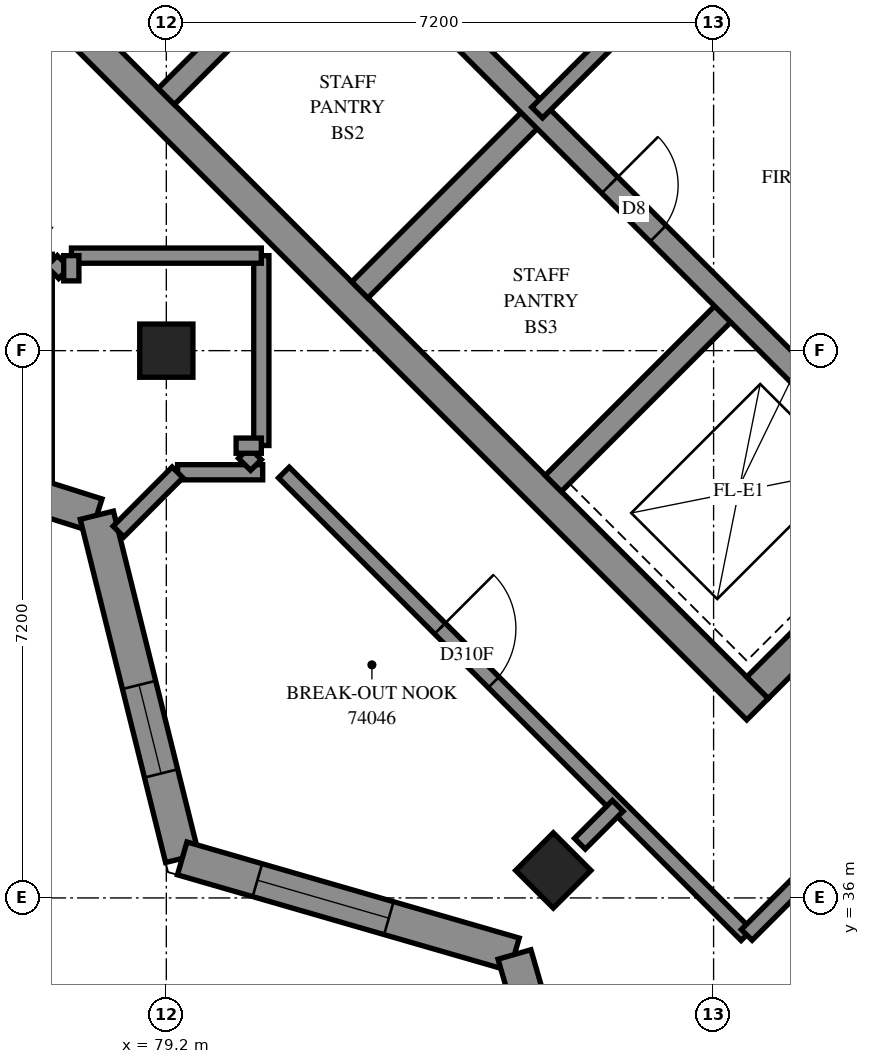
"""IFC4 building model, lengths in metres.
Left out: names, types, materials, properties, quantities, classifications, styles, units other than length and angle.
Written with IfcOpenShell. Run it as: python <this file> out.ifc"""

import sys

from ifc_helpers import new_model, si_unit, direction, frame, frame_2d, origin, origin_2d, place, context, subcontext, project, spatial, polyline, rectangle, outline, extrude, element, fill, save


model = new_model("IFC4")
c1 = context("Model", 3, precision=1e-05, world=origin(), true_north=direction((0.0, 1.0)))
c2 = subcontext(c1, "Body", "Model", "MODEL_VIEW")
j1 = project(units=[si_unit("LENGTHUNIT", "METRE"), si_unit("PLANEANGLEUNIT", "RADIAN")], contexts=[c1])
p1 = place(None, origin())
s1 = spatial("IfcSite", under=j1, at=p1, CompositionType="ELEMENT")
p2 = place(p1, origin())
s2 = spatial("IfcBuilding", under=s1, at=p2, CompositionType="ELEMENT")
p3 = place(p2, frame((0.0, 0.0, 271.0)))
s3 = spatial("IfcBuildingStorey", under=s2, at=p3, CompositionType="ELEMENT", Elevation=271.0)
for number, where, z_axis, x_axis in (
    (1, (79.2, 43.2, 0.0), (0.0, 0.0, 1.0), (1.0, 0.0, 0.0)),
    (2, (84.291, 36.362, 0.0), (0.0, 0.0, 1.0), (0.707, -0.707, 0.0)),
):
    element("IfcColumn", number, at=place(p3, frame(where, z_axis=z_axis, x_axis=x_axis)), inside=s3, PredefinedType="COLUMN", context=c2, shape_type="SweptSolid", body=[
        extrude(rectangle(XDim=0.7, YDim=0.7, at=origin_2d()), origin(), (0.0, 0.0, 1.0), 3.1),
    ])
p4 = place(p3, frame((76.23, 49.231, -0.3), z_axis=(0.0, 0.0, 1.0), x_axis=(0.7071034917, -0.7071100706, 0.0)))
e3 = element("IfcWall", 3, at=p4, inside=s3, PredefinedType="SHEAR", context=c2, shape_type="SweptSolid", body=[
    extrude(rectangle(XDim=15.2, YDim=0.4, at=frame_2d((7.6, 0.0))), origin(), (0.0, 0.0, 1.0), 2.7),
])
p5 = place(p3, frame((86.978, 38.766, -0.3), z_axis=(0.0, 0.0, 1.0), x_axis=(0.7071067812, 0.7071067812, 0.0)))
e4 = element("IfcWall", 4, at=p5, inside=s3, PredefinedType="SHEAR", context=c2, shape_type="SweptSolid", body=[
    extrude(rectangle(XDim=14.4, YDim=0.4, at=frame_2d((7.2, 0.0))), origin(), (0.0, 0.0, 1.0), 2.7),
])
p6 = place(p5, frame((4.55, 0.0, 0.3)))
e5 = element("IfcOpeningElement", 5, at=p6, cuts=e4, PredefinedType="OPENING", context=c2, shape_type="SweptSolid", body=[
    extrude(rectangle(XDim=1.1, YDim=2.1, at=frame_2d((0.55, 1.05))), frame((0.0, 0.21, 0.0), z_axis=(0.0, -1.0, 0.0), x_axis=(1.0, 0.0, 0.0)), (0.0, 0.0, 1.0), 0.42),
])
p7 = place(p5, frame((11.35, 0.0, 0.3)))
e6 = element("IfcOpeningElement", 6, at=p7, cuts=e4, PredefinedType="OPENING", context=c2, shape_type="SweptSolid", body=[
    extrude(rectangle(XDim=1.1, YDim=2.1, at=frame_2d((0.55, 1.05))), frame((0.0, 0.21, 0.0), z_axis=(0.0, -1.0, 0.0), x_axis=(1.0, 0.0, 0.0)), (0.0, 0.0, 1.0), 0.42),
])
p8 = place(p3, frame((79.2, 46.544, 0.0), z_axis=(0.0, 0.0, 1.0), x_axis=(0.7071219326, 0.7070916295, 0.0)))
e7 = element("IfcWall", 7, at=p8, inside=s3, PredefinedType="SOLIDWALL", context=c2, shape_type="SweptSolid", body=[
    extrude(rectangle(XDim=3.3, YDim=0.3, at=frame_2d((1.65, 0.0))), origin(), (0.0, 0.0, 1.0), 3.1),
])
for number, where, z_axis, x_axis in (
    (8, (81.746, 43.999, 0.0), (0.0, 0.0, 1.0), (0.707, 0.707, 0.0)),
    (9, (84.291, 41.453, 0.0), (0.0, 0.0, 1.0), (0.707, 0.707, 0.0)),
):
    element("IfcWall", number, at=place(p3, frame(where, z_axis=z_axis, x_axis=x_axis)), inside=s3, PredefinedType="SOLIDWALL", context=c2, shape_type="SweptSolid", body=[
        extrude(rectangle(XDim=3.3, YDim=0.3, at=frame_2d((1.65, 0.0))), origin(), (0.0, 0.0, 1.0), 3.1),
    ])
p9 = place(p3, frame((78.988, 51.423, 0.0), z_axis=(0.0, 0.0, 1.0), x_axis=(0.7071067812, -0.7071067812, 0.0)))
e10 = element("IfcWall", 10, at=p9, inside=s3, PredefinedType="SOLIDWALL", context=c2, shape_type="SweptSolid", body=[
    extrude(rectangle(XDim=14.4, YDim=0.3, at=frame_2d((7.2, 0.0))), origin(), (0.0, 0.0, 1.0), 3.1),
])
p10 = place(p9, frame((1.35, 0.0, 0.0)))
e11 = element("IfcOpeningElement", 11, at=p10, cuts=e10, PredefinedType="OPENING", context=c2, shape_type="SweptSolid", body=[
    extrude(rectangle(XDim=0.9, YDim=2.1, at=frame_2d((0.45, 1.05))), frame((0.0, 0.16, 0.0), z_axis=(0.0, -1.0, 0.0), x_axis=(1.0, 0.0, 0.0)), (0.0, 0.0, 1.0), 0.32),
])
p11 = place(p9, frame((4.95, 0.0, 0.0)))
e12 = element("IfcOpeningElement", 12, at=p11, cuts=e10, PredefinedType="OPENING", context=c2, shape_type="SweptSolid", body=[
    extrude(rectangle(XDim=0.9, YDim=2.1, at=frame_2d((0.45, 1.05))), frame((0.0, 0.16, 0.0), z_axis=(0.0, -1.0, 0.0), x_axis=(1.0, 0.0, 0.0)), (0.0, 0.0, 1.0), 0.32),
])
p12 = place(p9, frame((8.55, 0.0, 0.0)))
e13 = element("IfcOpeningElement", 13, at=p12, cuts=e10, PredefinedType="OPENING", context=c2, shape_type="SweptSolid", body=[
    extrude(rectangle(XDim=0.9, YDim=2.1, at=frame_2d((0.45, 1.05))), frame((0.0, 0.16, 0.0), z_axis=(0.0, -1.0, 0.0), x_axis=(1.0, 0.0, 0.0)), (0.0, 0.0, 1.0), 0.32),
])
p13 = place(p9, frame((12.05, 0.0, 0.0)))
e14 = element("IfcOpeningElement", 14, at=p13, cuts=e10, PredefinedType="OPENING", context=c2, shape_type="SweptSolid", body=[
    extrude(rectangle(XDim=1.1, YDim=2.1, at=frame_2d((0.55, 1.05))), frame((0.0, 0.16, 0.0), z_axis=(0.0, -1.0, 0.0), x_axis=(1.0, 0.0, 0.0)), (0.0, 0.0, 1.0), 0.32),
])
p14 = place(p3, frame((81.534, 53.969, 0.0), z_axis=(0.0, 0.0, 1.0), x_axis=(0.707103309, -0.7071102534, 0.0)))
e15 = element("IfcWall", 15, at=p14, inside=s3, PredefinedType="SOLIDWALL", context=c2, shape_type="SweptSolid", body=[
    extrude(rectangle(XDim=14.4, YDim=0.3, at=frame_2d((7.2, 0.0))), origin(), (0.0, 0.0, 1.0), 3.1),
])
p15 = place(p14, frame((8.55, 0.0, 0.0)))
e16 = element("IfcOpeningElement", 16, at=p15, cuts=e15, PredefinedType="OPENING", context=c2, shape_type="SweptSolid", body=[
    extrude(rectangle(XDim=0.9, YDim=2.1, at=frame_2d((0.45, 1.05))), frame((0.0, 0.16, 0.0), z_axis=(0.0, -1.0, 0.0), x_axis=(1.0, 0.0, 0.0)), (0.0, 0.0, 1.0), 0.32),
])
p16 = place(p14, frame((1.25, 0.0, 0.0)))
e17 = element("IfcOpeningElement", 17, at=p16, cuts=e15, PredefinedType="OPENING", context=c2, shape_type="SweptSolid", body=[
    extrude(rectangle(XDim=1.1, YDim=2.1, at=frame_2d((0.55, 1.05))), frame((0.0, 0.16, 0.0), z_axis=(0.0, -1.0, 0.0), x_axis=(1.0, 0.0, 0.0)), (0.0, 0.0, 1.0), 0.32),
])
p17 = place(p14, frame((4.85, 0.0, 0.0)))
e18 = element("IfcOpeningElement", 18, at=p17, cuts=e15, PredefinedType="OPENING", context=c2, shape_type="SweptSolid", body=[
    extrude(rectangle(XDim=1.1, YDim=2.1, at=frame_2d((0.55, 1.05))), frame((0.0, 0.16, 0.0), z_axis=(0.0, -1.0, 0.0), x_axis=(1.0, 0.0, 0.0)), (0.0, 0.0, 1.0), 0.32),
])
p18 = place(p14, frame((12.05, 0.0, 0.0)))
e19 = element("IfcOpeningElement", 19, at=p18, cuts=e15, PredefinedType="OPENING", context=c2, shape_type="SweptSolid", body=[
    extrude(rectangle(XDim=1.1, YDim=2.1, at=frame_2d((0.55, 1.05))), frame((0.0, 0.16, 0.0), z_axis=(0.0, -1.0, 0.0), x_axis=(1.0, 0.0, 0.0)), (0.0, 0.0, 1.0), 0.32),
])
p19 = place(p3, frame((74.504, 42.23, 0.0), z_axis=(0.0, 0.0, 1.0), x_axis=(0.9534896492, -0.3014257601, 0.0)))
e20 = element("IfcWall", 20, at=p19, inside=s3, PredefinedType="SOLIDWALL", context=c2, shape_type="SweptSolid", body=[
    extrude(outline(polyline([(0.052, -0.225), (3.841, -0.225), (4.093, 0.225), (-0.052, 0.225), (0.052, -0.225)])), origin(), (0.0, 0.0, 1.0), 3.1),
])
p20 = place(p19, frame((1.808, 0.0, 0.45)))
e21 = element("IfcOpeningElement", 21, at=p20, cuts=e20, PredefinedType="OPENING", context=c2, shape_type="SweptSolid", body=[
    extrude(rectangle(XDim=1.2, YDim=2.55, at=frame_2d((0.6, 1.275))), frame((0.0, 0.235, 0.0), z_axis=(0.0, -1.0, 0.0), x_axis=(1.0, 0.0, 0.0)), (0.0, 0.0, 1.0), 0.47),
])
p21 = place(p3, frame((78.286, 41.035, 0.0), z_axis=(0.0, 0.0, 1.0), x_axis=(0.2414328965, -0.9704175166, 0.0)))
e22 = element("IfcWall", 22, at=p21, inside=s3, PredefinedType="SOLIDWALL", context=c2, shape_type="SweptSolid", body=[
    extrude(outline(polyline([(0.126, -0.225), (4.782, -0.225), (4.522, 0.225), (-0.126, 0.225), (0.126, -0.225)])), origin(), (0.0, 0.0, 1.0), 3.1),
])
p22 = place(p21, frame((2.3, 0.0, 0.45)))
e23 = element("IfcOpeningElement", 23, at=p22, cuts=e22, PredefinedType="OPENING", context=c2, shape_type="SweptSolid", body=[
    extrude(rectangle(XDim=1.2, YDim=2.55, at=frame_2d((0.6, 1.275))), frame((0.0, 0.235, 0.0), z_axis=(0.0, -1.0, 0.0), x_axis=(1.0, 0.0, 0.0)), (0.0, 0.0, 1.0), 0.47),
])
p23 = place(p3, frame((79.409, 36.52, 0.0), z_axis=(0.0, 0.0, 1.0), x_axis=(0.9606525687, -0.2777528438, 0.0)))
e24 = element("IfcWall", 24, at=p23, inside=s3, PredefinedType="SOLIDWALL", context=c2, shape_type="SweptSolid", body=[
    extrude(outline(polyline([(-0.13, -0.225), (4.426, -0.225), (4.675, 0.225), (0.13, 0.225), (-0.13, -0.225)])), origin(), (0.0, 0.0, 1.0), 3.1),
])
p24 = place(p23, frame((1.03, 0.0, 0.7)))
e25 = element("IfcOpeningElement", 25, at=p24, cuts=e24, PredefinedType="OPENING", context=c2, shape_type="SweptSolid", body=[
    extrude(rectangle(XDim=1.8, YDim=1.8, at=frame_2d((0.9, 0.9))), frame((0.0, 0.235, 0.0), z_axis=(0.0, -1.0, 0.0), x_axis=(1.0, 0.0, 0.0)), (0.0, 0.0, 1.0), 0.47),
])
p25 = place(p3, frame((83.78, 35.256, 0.0), z_axis=(0.0, 0.0, 1.0), x_axis=(0.2777528438, -0.9606525687, 0.0)))
e26 = element("IfcWall", 26, at=p25, inside=s3, PredefinedType="SOLIDWALL", context=c2, shape_type="SweptSolid", body=[
    extrude(outline(polyline([(0.124, -0.225), (4.68, -0.225), (4.421, 0.225), (-0.124, 0.225), (0.124, -0.225)])), origin(), (0.0, 0.0, 1.0), 3.1),
])
p26 = place(p25, frame((0.686, 0.0, 0.7)))
e27 = element("IfcOpeningElement", 27, at=p26, cuts=e26, PredefinedType="OPENING", context=c2, shape_type="SweptSolid", body=[
    extrude(rectangle(XDim=1.8, YDim=1.8, at=frame_2d((0.9, 0.9))), frame((0.0, 0.235, 0.0), z_axis=(0.0, -1.0, 0.0), x_axis=(1.0, 0.0, 0.0)), (0.0, 0.0, 1.0), 0.47),
])
p27 = place(p3, frame((84.079, 46.332, 0.0), z_axis=(0.0, 0.0, 1.0), x_axis=(0.7071067812, 0.7071067812, 0.0)))
e28 = element("IfcWall", 28, at=p27, inside=s3, PredefinedType="PARTITIONING", context=c2, shape_type="SweptSolid", body=[
    extrude(rectangle(XDim=3.6, YDim=0.2, at=frame_2d((1.8, 0.0))), origin(), (0.0, 0.0, 1.0), 3.1),
])
p28 = place(p3, frame((84.97, 31.951, 0.0), z_axis=(0.0, 0.0, 1.0), x_axis=(0.7071025578, 0.7071110045, 0.0)))
e29 = element("IfcWall", 29, at=p28, inside=s3, PredefinedType="PARTITIONING", context=c2, shape_type="SweptSolid", body=[
    extrude(rectangle(XDim=11.839, YDim=0.2, at=frame_2d((5.92, 0.0))), origin(), (0.0, 0.0, 1.0), 3.1),
])
p29 = place(p3, frame((80.747, 41.597, 0.0), z_axis=(0.0, 0.0, 1.0), x_axis=(0.7071067812, -0.7071067812, 0.0)))
e30 = element("IfcWall", 30, at=p29, inside=s3, PredefinedType="PARTITIONING", context=c2, shape_type="SweptSolid", body=[
    extrude(rectangle(XDim=8.607, YDim=0.2, at=frame_2d((4.303, 0.0))), origin(), (0.0, 0.0, 1.0), 3.1),
])
p30 = place(p29, frame((2.903, 0.0, 0.0)))
e31 = element("IfcOpeningElement", 31, at=p30, cuts=e30, PredefinedType="OPENING", context=c2, shape_type="SweptSolid", body=[
    extrude(rectangle(XDim=1.0, YDim=2.1, at=frame_2d((0.5, 1.05))), frame((0.0, 0.11, 0.0), z_axis=(0.0, -1.0, 0.0), x_axis=(1.0, 0.0, 0.0)), (0.0, 0.0, 1.0), 0.22),
])
p31 = place(p3, frame((86.836, 35.514, 0.0), z_axis=(0.0, 0.0, 1.0), x_axis=(0.7071067812, 0.7071067812, 0.0)))
e32 = element("IfcWall", 32, at=p31, inside=s3, PredefinedType="PARTITIONING", context=c2, shape_type="SweptSolid", body=[
    extrude(rectangle(XDim=7.999, YDim=0.2, at=frame_2d((3.999, 0.0))), origin(), (0.0, 0.0, 1.0), 3.1),
])
p32 = place(p31, frame((6.742, 0.0, 0.0)))
e33 = element("IfcOpeningElement", 33, at=p32, cuts=e32, PredefinedType="OPENING", context=c2, shape_type="SweptSolid", body=[
    extrude(rectangle(XDim=1.0, YDim=2.1, at=frame_2d((0.5, 1.05))), frame((0.0, 0.11, 0.0), z_axis=(0.0, -1.0, 0.0), x_axis=(1.0, 0.0, 0.0)), (0.0, 0.0, 1.0), 0.22),
])
p33 = place(p3, frame((77.6, 41.487, 0.0), z_axis=(0.0, 0.0, 1.0), x_axis=(0.0, 1.0, 0.0)))
e34 = element("IfcWall", 34, at=p33, inside=s3, PredefinedType="PARTITIONING", context=c2, shape_type="SweptSolid", body=[
    extrude(rectangle(XDim=2.981, YDim=0.2, at=frame_2d((1.49, 0.0))), origin(), (0.0, 0.0, 1.0), 3.1),
])
for number, where, z_axis, x_axis in (
    (35, (80.45, 41.952, 0.0), (0.0, 0.0, 1.0), (0.0, 1.0, 0.0)),
    (36, (77.952, 44.45, 0.0), (0.0, 0.0, 1.0), (1.0, 0.0, 0.0)),
):
    element("IfcWall", number, at=place(p3, frame(where, z_axis=z_axis, x_axis=x_axis)), inside=s3, PredefinedType="PARTITIONING", context=c2, shape_type="SweptSolid", body=[
        extrude(rectangle(XDim=2.498, YDim=0.2, at=frame_2d((1.249, 0.0))), origin(), (0.0, 0.0, 1.0), 3.1),
    ])
p34 = place(p3, frame((79.348, 41.6, 0.0), z_axis=(0.0, 0.0, 1.0), x_axis=(1.0, 0.0, 0.0)))
e37 = element("IfcWall", 37, at=p34, inside=s3, PredefinedType="PARTITIONING", context=c2, shape_type="SweptSolid", body=[
    extrude(rectangle(XDim=1.12, YDim=0.2, at=frame_2d((0.56, 0.0))), origin(), (0.0, 0.0, 1.0), 3.1),
])
p35 = place(p3, frame((78.571, 40.82, 0.0), z_axis=(0.0, 0.0, 1.0), x_axis=(0.7059234937, 0.7082880918, 0.0)))
e38 = element("IfcWall", 38, at=p35, inside=s3, PredefinedType="PARTITIONING", context=c2, shape_type="SweptSolid", body=[
    extrude(rectangle(XDim=1.1, YDim=0.2, at=frame_2d((0.55, 0.0))), origin(), (0.0, 0.0, 1.0), 3.1),
])
p36 = place(p3, frame((84.641, 36.713, 0.0), z_axis=(0.0, 0.0, 1.0), x_axis=(0.7071067812, 0.7071067812, 0.0)))
e39 = element("IfcWall", 39, at=p36, inside=s3, PredefinedType="PARTITIONING", context=c2, shape_type="SweptSolid", body=[
    extrude(rectangle(XDim=0.704, YDim=0.2, at=frame_2d((0.352, 0.0))), origin(), (0.0, 0.0, 1.0), 3.1),
])
for number, where, z_axis, x_axis in (
    (40, (80.221, 41.855, 0.0), (0.0, 0.0, 1.0), (0.707, -0.707, 0.0)),
    (41, (77.695, 44.38, 0.0), (0.0, 0.0, 1.0), (0.707, -0.707, 0.0)),
):
    element("IfcWall", number, at=place(p3, frame(where, z_axis=z_axis, x_axis=x_axis)), inside=s3, PredefinedType="PARTITIONING", context=c2, shape_type="SweptSolid", body=[
        extrude(rectangle(XDim=0.225, YDim=0.2, at=frame_2d((0.112, 0.0))), origin(), (0.0, 0.0, 1.0), 3.1),
    ])
for number, where, z_axis, x_axis in (
    (42, (80.118, 41.95, 0.0), (0.0, 0.0, 1.0), (1.0, 0.0, 0.0)),
    (43, (77.95, 44.118, 0.0), (0.0, 0.0, 1.0), (0.0, 1.0, 0.0)),
):
    element("IfcWall", number, at=place(p3, frame(where, z_axis=z_axis, x_axis=x_axis)), inside=s3, PredefinedType="PARTITIONING", context=c2, shape_type="SweptSolid", body=[
        extrude(rectangle(XDim=0.332, YDim=0.2, at=frame_2d((0.166, 0.0))), origin(), (0.0, 0.0, 1.0), 3.1),
    ])
p37 = place(p22, origin())
e44 = element("IfcWindow", 44, at=p37, inside=s3, PartitioningType="SINGLE_PANEL", PredefinedType="WINDOW", context=c2, shape_type="SweptSolid", body=[
    extrude(rectangle(XDim=1.2, YDim=2.55, at=frame_2d((0.6, 1.275))), frame((0.0, 0.205, 0.0), z_axis=(0.0, -1.0, 0.0), x_axis=(1.0, 0.0, 0.0)), (0.0, 0.0, 1.0), 0.06),
])
fill(e23, e44)
p38 = place(p24, origin())
e45 = element("IfcWindow", 45, at=p38, inside=s3, PartitioningType="SINGLE_PANEL", PredefinedType="WINDOW", context=c2, shape_type="SweptSolid", body=[
    extrude(rectangle(XDim=1.8, YDim=1.8, at=frame_2d((0.9, 0.9))), frame((0.0, 0.205, 0.0), z_axis=(0.0, -1.0, 0.0), x_axis=(1.0, 0.0, 0.0)), (0.0, 0.0, 1.0), 0.06),
])
fill(e25, e45)
p39 = place(p12, origin())
e46 = element("IfcDoor", 46, at=p39, inside=s3, OperationType="SINGLE_SWING_LEFT", PredefinedType="DOOR", context=c2, shape_type="SweptSolid", body=[
    extrude(rectangle(XDim=0.9, YDim=2.1, at=frame_2d((0.45, 1.05))), frame((0.0, 0.025, 0.0), z_axis=(0.0, -1.0, 0.0), x_axis=(1.0, 0.0, 0.0)), (0.0, 0.0, 1.0), 0.05),
])
fill(e13, e46)
p40 = place(p30, origin())
e47 = element("IfcDoor", 47, at=p40, inside=s3, OperationType="SINGLE_SWING_RIGHT", PredefinedType="DOOR", context=c2, shape_type="SweptSolid", body=[
    extrude(rectangle(XDim=1.0, YDim=2.1, at=frame_2d((0.5, 1.05))), frame((0.0, 0.025, 0.0), z_axis=(0.0, -1.0, 0.0), x_axis=(1.0, 0.0, 0.0)), (0.0, 0.0, 1.0), 0.05),
])
fill(e31, e47)
save(model, sys.argv[1])
